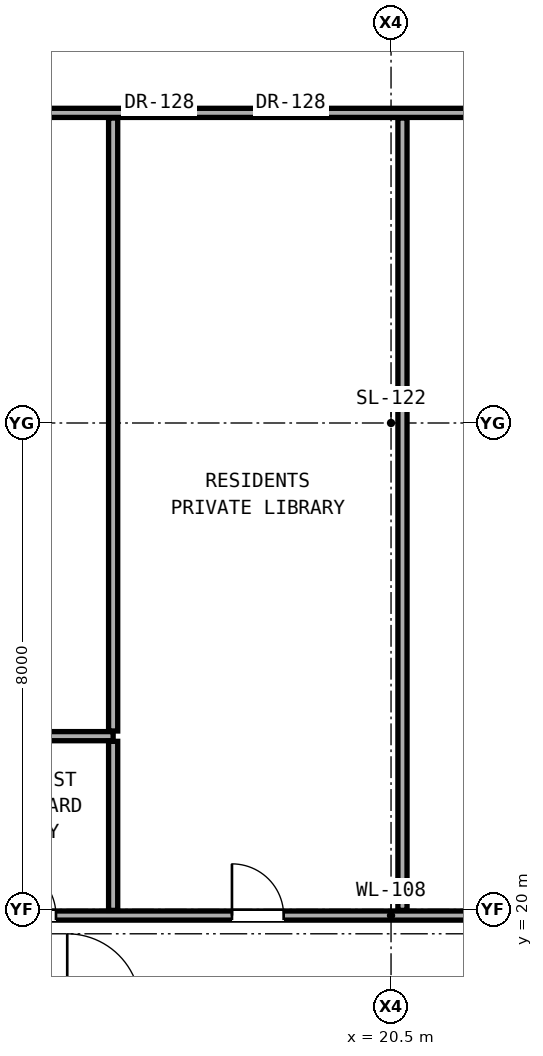
"""IFC4 building model, lengths in metres.
Left out: names, types, materials, properties, quantities, classifications, styles, units other than length and angle.
Written with IfcOpenShell. Run it as: python <this file> out.ifc"""

import sys

from ifc_helpers import new_model, si_unit, direction, frame, frame_2d, origin, place, context, subcontext, project, spatial, rectangle, extrude, element, fill, save


model = new_model("IFC4")
c1 = context("Model", 3, precision=1e-05, world=origin(), true_north=direction((0.0, 1.0)))
c2 = subcontext(c1, "Body", "Model", "MODEL_VIEW")
j1 = project(units=[si_unit("LENGTHUNIT", "METRE"), si_unit("PLANEANGLEUNIT", "RADIAN")], contexts=[c1])
p1 = place(None, origin())
s1 = spatial("IfcSite", under=j1, at=p1, CompositionType="ELEMENT")
p2 = place(p1, origin())
s2 = spatial("IfcBuilding", under=s1, at=p2, CompositionType="ELEMENT")
p3 = place(p2, frame((0.0, 0.0, 65.3)))
s3 = spatial("IfcBuildingStorey", under=s2, at=p3, CompositionType="ELEMENT", Elevation=65.3)
p4 = place(p3, frame((10.2, 19.9, 0.0), z_axis=(0.0, 0.0, 1.0), x_axis=(1.0, 0.0, 0.0)))
e1 = element("IfcWall", 1, at=p4, inside=s3, PredefinedType="PARTITIONING", context=c2, shape_type="SweptSolid", body=[
    extrude(rectangle(XDim=20.6, YDim=0.15, at=frame_2d((10.3, 0.0))), origin(), (0.0, 0.0, 1.0), 2.104),
])
p5 = place(p4, frame((1.695, 0.0, 0.0)))
e2 = element("IfcOpeningElement", 2, at=p5, cuts=e1, PredefinedType="OPENING", context=c2, shape_type="SweptSolid", body=[
    extrude(rectangle(XDim=0.85, YDim=2.01, at=frame_2d((0.425, 1.005))), frame((0.0, 0.085, 0.0), z_axis=(0.0, -1.0, 0.0), x_axis=(1.0, 0.0, 0.0)), (0.0, 0.0, 1.0), 0.17),
])
p6 = place(p4, frame((3.94, 0.0, 0.0)))
e3 = element("IfcOpeningElement", 3, at=p6, cuts=e1, PredefinedType="OPENING", context=c2, shape_type="SweptSolid", body=[
    extrude(rectangle(XDim=0.85, YDim=2.01, at=frame_2d((0.425, 1.005))), frame((0.0, 0.085, 0.0), z_axis=(0.0, -1.0, 0.0), x_axis=(1.0, 0.0, 0.0)), (0.0, 0.0, 1.0), 0.17),
])
p7 = place(p4, frame((7.684, 0.0, 0.0)))
e4 = element("IfcOpeningElement", 4, at=p7, cuts=e1, PredefinedType="OPENING", context=c2, shape_type="SweptSolid", body=[
    extrude(rectangle(XDim=0.85, YDim=2.01, at=frame_2d((0.425, 1.005))), frame((0.0, 0.085, 0.0), z_axis=(0.0, -1.0, 0.0), x_axis=(1.0, 0.0, 0.0)), (0.0, 0.0, 1.0), 0.17),
])
p8 = place(p3, frame((10.2, 22.85, 0.0), z_axis=(0.0, 0.0, 1.0), x_axis=(1.0, 0.0, 0.0)))
e5 = element("IfcWall", 5, at=p8, inside=s3, PredefinedType="PARTITIONING", context=c2, shape_type="SweptSolid", body=[
    extrude(rectangle(XDim=5.73, YDim=0.15, at=frame_2d((2.865, 0.0))), origin(), (0.0, 0.0, 1.0), 2.104),
])
p9 = place(p3, frame((10.2, 33.1, 0.0), z_axis=(0.0, 0.0, 1.0), x_axis=(1.0, 0.0, 0.0)))
e6 = element("IfcWall", 6, at=p9, inside=s3, PredefinedType="PARTITIONING", context=c2, shape_type="SweptSolid", body=[
    extrude(rectangle(XDim=20.6, YDim=0.15, at=frame_2d((10.3, 0.0))), origin(), (0.0, 0.0, 1.0), 2.104),
])
p10 = place(p9, frame((12.666, 0.0, 0.0)))
e7 = element("IfcOpeningElement", 7, at=p10, cuts=e6, PredefinedType="OPENING", context=c2, shape_type="SweptSolid", body=[
    extrude(rectangle(XDim=0.85, YDim=2.01, at=frame_2d((0.425, 1.005))), frame((0.0, 0.085, 0.0), z_axis=(0.0, -1.0, 0.0), x_axis=(1.0, 0.0, 0.0)), (0.0, 0.0, 1.0), 0.17),
])
p11 = place(p9, frame((17.701, 0.0, 0.0)))
e8 = element("IfcOpeningElement", 8, at=p11, cuts=e6, PredefinedType="OPENING", context=c2, shape_type="SweptSolid", body=[
    extrude(rectangle(XDim=0.85, YDim=2.01, at=frame_2d((0.425, 1.005))), frame((0.0, 0.085, 0.0), z_axis=(0.0, -1.0, 0.0), x_axis=(1.0, 0.0, 0.0)), (0.0, 0.0, 1.0), 0.17),
])
p12 = place(p3, frame((15.93, 19.985, 0.0), z_axis=(0.0, 0.0, 1.0), x_axis=(0.0, 1.0, 0.0)))
e9 = element("IfcWall", 9, at=p12, inside=s3, PredefinedType="PARTITIONING", context=c2, shape_type="SweptSolid", body=[
    extrude(rectangle(XDim=2.78, YDim=0.15, at=frame_2d((1.39, 0.0))), origin(), (0.0, 0.0, 1.0), 2.589),
])
p13 = place(p3, frame((15.93, 22.935, 0.0), z_axis=(0.0, 0.0, 1.0), x_axis=(0.0, 1.0, 0.0)))
e10 = element("IfcWall", 10, at=p13, inside=s3, PredefinedType="PARTITIONING", context=c2, shape_type="SweptSolid", body=[
    extrude(rectangle(XDim=10.08, YDim=0.15, at=frame_2d((5.04, 0.0))), origin(), (0.0, 0.0, 1.0), 2.104),
])
p14 = place(p3, frame((20.688, 19.985, 0.0), z_axis=(0.0, 0.0, 1.0), x_axis=(0.0, 1.0, 0.0)))
e11 = element("IfcWall", 11, at=p14, inside=s3, PredefinedType="PARTITIONING", context=c2, shape_type="SweptSolid", body=[
    extrude(rectangle(XDim=13.03, YDim=0.15, at=frame_2d((6.515, 0.0))), origin(), (0.0, 0.0, 1.0), 2.104),
])
p15 = place(p6, origin())
e12 = element("IfcDoor", 12, at=p15, inside=s3, OperationType="SINGLE_SWING_LEFT", PredefinedType="DOOR", context=c2, shape_type="SweptSolid", body=[
    extrude(rectangle(XDim=0.85, YDim=2.01, at=frame_2d((0.425, 1.005))), frame((0.0, 0.025, 0.0), z_axis=(0.0, -1.0, 0.0), x_axis=(1.0, 0.0, 0.0)), (0.0, 0.0, 1.0), 0.05),
])
fill(e3, e12)
p16 = place(p7, origin())
e13 = element("IfcDoor", 13, at=p16, inside=s3, OperationType="SINGLE_SWING_LEFT", PredefinedType="DOOR", context=c2, shape_type="SweptSolid", body=[
    extrude(rectangle(XDim=0.85, YDim=2.01, at=frame_2d((0.425, 1.005))), frame((0.0, 0.025, 0.0), z_axis=(0.0, -1.0, 0.0), x_axis=(1.0, 0.0, 0.0)), (0.0, 0.0, 1.0), 0.05),
])
fill(e4, e13)
save(model, sys.argv[1])
